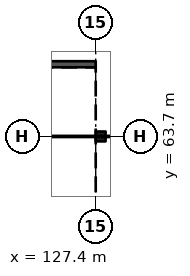
"""IFC4 building model, lengths in metres.
Left out: names, types, materials, properties, quantities, classifications, styles, units other than length and angle.
Written with IfcOpenShell. Run it as: python <this file> out.ifc"""

import sys

from ifc_helpers import new_model, si_unit, direction, frame, frame_2d, origin, origin_2d, place, context, subcontext, project, spatial, rectangle, extrude, element, save


model = new_model("IFC4")
c1 = context("Model", 3, precision=1e-05, world=origin(), true_north=direction((0.0, 1.0)))
c2 = subcontext(c1, "Body", "Model", "MODEL_VIEW")
j1 = project(units=[si_unit("LENGTHUNIT", "METRE"), si_unit("PLANEANGLEUNIT", "RADIAN")], contexts=[c1])
p1 = place(None, origin())
s1 = spatial("IfcSite", under=j1, at=p1, CompositionType="ELEMENT")
p2 = place(p1, origin())
s2 = spatial("IfcBuilding", under=s1, at=p2, CompositionType="ELEMENT")
p3 = place(p2, frame((0.0, 0.0, 6.37)))
s3 = spatial("IfcBuildingStorey", under=s2, at=p3, CompositionType="ELEMENT", Elevation=6.37)
p4 = place(p3, frame((127.725, 63.7, 0.0), z_axis=(0.0, 0.0, 1.0), x_axis=(1.0, 0.0, 0.0)))
e1 = element("IfcColumn", 1, at=p4, inside=s3, PredefinedType="COLUMN", context=c2, shape_type="SweptSolid", body=[
    extrude(rectangle(XDim=0.65, YDim=0.65, at=origin_2d()), origin(), (0.0, 0.0, 1.0), 4.55),
])
p5 = place(p3, frame((104.65, 68.45, 0.0), z_axis=(0.0, 0.0, 1.0), x_axis=(1.0, 0.0, 0.0)))
e2 = element("IfcWall", 2, at=p5, inside=s3, PredefinedType="SHEAR", context=c2, shape_type="SweptSolid", body=[
    extrude(rectangle(XDim=22.75, YDim=0.4, at=frame_2d((11.375, 0.0))), origin(), (0.0, 0.0, 1.0), 4.55),
])
save(model, sys.argv[1])
